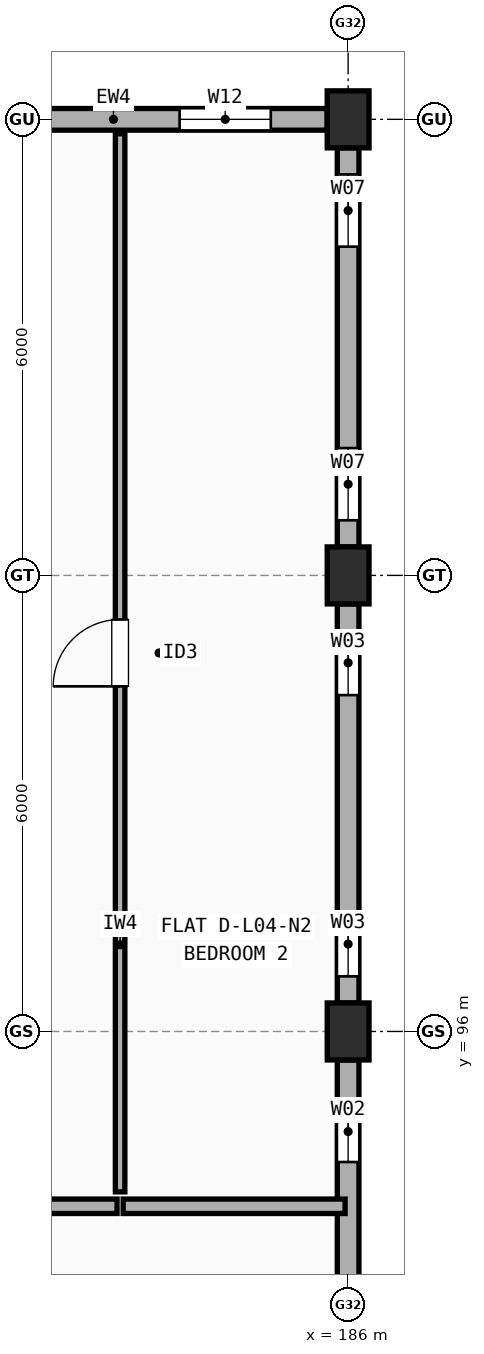
"""IFC4 building model, lengths in metres.
Left out: names, types, materials, properties, quantities, classifications, styles, units other than length and angle.
Written with IfcOpenShell. Run it as: python <this file> out.ifc"""

import sys

from ifc_helpers import new_model, si_unit, direction, frame, frame_2d, origin, origin_2d, place, context, subcontext, project, spatial, rectangle, extrude, element, fill, save


model = new_model("IFC4")
c1 = context("Model", 3, precision=1e-05, world=origin(), true_north=direction((0.0, 1.0)))
c2 = subcontext(c1, "Body", "Model", "MODEL_VIEW")
j1 = project(units=[si_unit("LENGTHUNIT", "METRE"), si_unit("PLANEANGLEUNIT", "RADIAN")], contexts=[c1])
p1 = place(None, origin())
s1 = spatial("IfcSite", under=j1, at=p1, CompositionType="ELEMENT")
p2 = place(p1, origin())
s2 = spatial("IfcBuilding", under=s1, at=p2, CompositionType="ELEMENT")
p3 = place(p2, frame((0.0, 0.0, 14.1)))
s3 = spatial("IfcBuildingStorey", under=s2, at=p3, CompositionType="ELEMENT", Elevation=14.1)
for number, where, z_axis, x_axis in (
    (1, (186.0, 96.0, 0.0), (0.0, 0.0, 1.0), (1.0, 0.0, 0.0)),
    (2, (186.0, 102.0, 0.0), (0.0, 0.0, 1.0), (1.0, 0.0, 0.0)),
    (3, (186.0, 108.0, 0.0), (0.0, 0.0, 1.0), (1.0, 0.0, 0.0)),
):
    element("IfcColumn", number, at=place(p3, frame(where, z_axis=z_axis, x_axis=x_axis)), inside=s3, PredefinedType="COLUMN", context=c2, shape_type="SweptSolid", body=[
        extrude(rectangle(XDim=0.55, YDim=0.75, at=origin_2d()), origin(), (0.0, 0.0, 1.0), 2.95),
    ])
p4 = place(p3, frame((186.0, 90.375, 0.0), z_axis=(0.0, 0.0, 1.0), x_axis=(0.0, 1.0, 0.0)))
e4 = element("IfcWall", 4, at=p4, inside=s3, PredefinedType="STANDARD", context=c2, shape_type="SweptSolid", body=[
    extrude(rectangle(XDim=5.25, YDim=0.285, at=frame_2d((2.625, 0.0))), origin(), (0.0, 0.0, 1.0), 2.432),
])
p5 = place(p4, frame((1.042, 0.0, 0.9)))
e5 = element("IfcOpeningElement", 5, at=p5, cuts=e4, PredefinedType="OPENING", context=c2, shape_type="SweptSolid", body=[
    extrude(rectangle(XDim=1.2, YDim=1.35, at=frame_2d((0.6, 0.675))), frame((0.0, 0.152, 0.0), z_axis=(0.0, -1.0, 0.0), x_axis=(1.0, 0.0, 0.0)), (0.0, 0.0, 1.0), 0.305),
])
p6 = place(p4, frame((3.907, 0.0, 0.9)))
e6 = element("IfcOpeningElement", 6, at=p6, cuts=e4, PredefinedType="OPENING", context=c2, shape_type="SweptSolid", body=[
    extrude(rectangle(XDim=0.8, YDim=1.2, at=frame_2d((0.4, 0.6))), frame((0.0, 0.152, 0.0), z_axis=(0.0, -1.0, 0.0), x_axis=(1.0, 0.0, 0.0)), (0.0, 0.0, 1.0), 0.305),
])
p7 = place(p3, frame((186.0, 96.375, 0.0), z_axis=(0.0, 0.0, 1.0), x_axis=(0.0, 1.0, 0.0)))
e7 = element("IfcWall", 7, at=p7, inside=s3, PredefinedType="STANDARD", context=c2, shape_type="SweptSolid", body=[
    extrude(rectangle(XDim=5.25, YDim=0.285, at=frame_2d((2.625, 0.0))), origin(), (0.0, 0.0, 1.0), 2.432),
])
p8 = place(p7, frame((0.35, 0.0, 0.9)))
e8 = element("IfcOpeningElement", 8, at=p8, cuts=e7, PredefinedType="OPENING", context=c2, shape_type="SweptSolid", body=[
    extrude(rectangle(XDim=0.85, YDim=1.25, at=frame_2d((0.425, 0.625))), frame((0.0, 0.152, 0.0), z_axis=(0.0, -1.0, 0.0), x_axis=(1.0, 0.0, 0.0)), (0.0, 0.0, 1.0), 0.305),
])
p9 = place(p7, frame((4.05, 0.0, 0.9)))
e9 = element("IfcOpeningElement", 9, at=p9, cuts=e7, PredefinedType="OPENING", context=c2, shape_type="SweptSolid", body=[
    extrude(rectangle(XDim=0.85, YDim=1.25, at=frame_2d((0.425, 0.625))), frame((0.0, 0.152, 0.0), z_axis=(0.0, -1.0, 0.0), x_axis=(1.0, 0.0, 0.0)), (0.0, 0.0, 1.0), 0.305),
])
p10 = place(p3, frame((186.0, 102.375, 0.0), z_axis=(0.0, 0.0, 1.0), x_axis=(0.0, 1.0, 0.0)))
e10 = element("IfcWall", 10, at=p10, inside=s3, PredefinedType="STANDARD", context=c2, shape_type="SweptSolid", body=[
    extrude(rectangle(XDim=5.25, YDim=0.285, at=frame_2d((2.625, 0.0))), origin(), (0.0, 0.0, 1.0), 2.432),
])
p11 = place(p10, frame((0.35, 0.0, 0.9)))
e11 = element("IfcOpeningElement", 11, at=p11, cuts=e10, PredefinedType="OPENING", context=c2, shape_type="SweptSolid", body=[
    extrude(rectangle(XDim=0.95, YDim=1.35, at=frame_2d((0.475, 0.675))), frame((0.0, 0.152, 0.0), z_axis=(0.0, -1.0, 0.0), x_axis=(1.0, 0.0, 0.0)), (0.0, 0.0, 1.0), 0.305),
])
p12 = place(p10, frame((3.95, 0.0, 0.9)))
e12 = element("IfcOpeningElement", 12, at=p12, cuts=e10, PredefinedType="OPENING", context=c2, shape_type="SweptSolid", body=[
    extrude(rectangle(XDim=0.95, YDim=1.35, at=frame_2d((0.475, 0.675))), frame((0.0, 0.152, 0.0), z_axis=(0.0, -1.0, 0.0), x_axis=(1.0, 0.0, 0.0)), (0.0, 0.0, 1.0), 0.305),
])
p13 = place(p3, frame((185.725, 108.0, 0.0), z_axis=(0.0, 0.0, 1.0), x_axis=(-1.0, 0.0, 0.0)))
e13 = element("IfcWall", 13, at=p13, inside=s3, PredefinedType="STANDARD", context=c2, shape_type="SweptSolid", body=[
    extrude(rectangle(XDim=5.4, YDim=0.285, at=frame_2d((2.7, 0.0))), origin(), (0.0, 0.0, 1.0), 2.432),
])
p14 = place(p13, frame((0.742, 0.0, 0.9)))
e14 = element("IfcOpeningElement", 14, at=p14, cuts=e13, PredefinedType="OPENING", context=c2, shape_type="SweptSolid", body=[
    extrude(rectangle(XDim=1.2, YDim=1.35, at=frame_2d((0.6, 0.675))), frame((0.0, 0.152, 0.0), z_axis=(0.0, -1.0, 0.0), x_axis=(1.0, 0.0, 0.0)), (0.0, 0.0, 1.0), 0.305),
])
p15 = place(p13, frame((3.683, 0.0, 0.9)))
e15 = element("IfcOpeningElement", 15, at=p15, cuts=e13, PredefinedType="OPENING", context=c2, shape_type="SweptSolid", body=[
    extrude(rectangle(XDim=0.8, YDim=1.2, at=frame_2d((0.4, 0.6))), frame((0.0, 0.152, 0.0), z_axis=(0.0, -1.0, 0.0), x_axis=(1.0, 0.0, 0.0)), (0.0, 0.0, 1.0), 0.305),
])
p16 = place(p3, frame((172.54, 93.7, 0.0), z_axis=(0.0, 0.0, 1.0), x_axis=(1.0, 0.0, 0.0)))
e16 = element("IfcWall", 16, at=p16, inside=s3, PredefinedType="SOLIDWALL", context=c2, shape_type="SweptSolid", body=[
    extrude(rectangle(XDim=10.42, YDim=0.19, at=frame_2d((5.21, 0.0))), origin(), (0.0, 0.0, 1.0), 2.95),
])
p17 = place(p16, frame((4.71, 0.0, 0.0)))
e17 = element("IfcOpeningElement", 17, at=p17, cuts=e16, PredefinedType="OPENING", context=c2, shape_type="SweptSolid", body=[
    extrude(rectangle(XDim=1.0, YDim=2.15, at=frame_2d((0.5, 1.075))), frame((0.0, 0.105, 0.0), z_axis=(0.0, -1.0, 0.0), x_axis=(1.0, 0.0, 0.0)), (0.0, 0.0, 1.0), 0.21),
])
p18 = place(p3, frame((183.04, 93.7, 0.0), z_axis=(0.0, 0.0, 1.0), x_axis=(1.0, 0.0, 0.0)))
e18 = element("IfcWall", 18, at=p18, inside=s3, PredefinedType="SOLIDWALL", context=c2, shape_type="SweptSolid", body=[
    extrude(rectangle(XDim=2.92, YDim=0.19, at=frame_2d((1.46, 0.0))), origin(), (0.0, 0.0, 1.0), 2.432),
])
p19 = place(p3, frame((183.0, 93.89, 0.0), z_axis=(0.0, 0.0, 1.0), x_axis=(0.0, 1.0, 0.0)))
e19 = element("IfcWall", 19, at=p19, inside=s3, PredefinedType="PARTITIONING", context=c2, shape_type="SweptSolid", body=[
    extrude(rectangle(XDim=13.92, YDim=0.125, at=frame_2d((6.96, 0.0))), origin(), (0.0, 0.0, 1.0), 2.408),
])
p20 = place(p19, frame((6.65, 0.0, 0.0)))
e20 = element("IfcOpeningElement", 20, at=p20, cuts=e19, PredefinedType="OPENING", context=c2, shape_type="SweptSolid", body=[
    extrude(rectangle(XDim=0.88, YDim=2.1, at=frame_2d((0.44, 1.05))), frame((0.0, 0.073, 0.0), z_axis=(0.0, -1.0, 0.0), x_axis=(1.0, 0.0, 0.0)), (0.0, 0.0, 1.0), 0.145),
])
p21 = place(p6, origin())
e21 = element("IfcWindow", 21, at=p21, inside=s3, PartitioningType="SINGLE_PANEL", PredefinedType="WINDOW", context=c2, shape_type="SweptSolid", body=[
    extrude(rectangle(XDim=0.8, YDim=1.2, at=frame_2d((0.4, 0.6))), frame((0.0, 0.03, 0.0), z_axis=(0.0, -1.0, 0.0), x_axis=(1.0, 0.0, 0.0)), (0.0, 0.0, 1.0), 0.06),
])
fill(e6, e21)
p22 = place(p8, origin())
e22 = element("IfcWindow", 22, at=p22, inside=s3, PartitioningType="SINGLE_PANEL", PredefinedType="WINDOW", context=c2, shape_type="SweptSolid", body=[
    extrude(rectangle(XDim=0.85, YDim=1.25, at=frame_2d((0.425, 0.625))), frame((0.0, 0.03, 0.0), z_axis=(0.0, -1.0, 0.0), x_axis=(1.0, 0.0, 0.0)), (0.0, 0.0, 1.0), 0.06),
])
fill(e8, e22)
p23 = place(p9, origin())
e23 = element("IfcWindow", 23, at=p23, inside=s3, PartitioningType="SINGLE_PANEL", PredefinedType="WINDOW", context=c2, shape_type="SweptSolid", body=[
    extrude(rectangle(XDim=0.85, YDim=1.25, at=frame_2d((0.425, 0.625))), frame((0.0, 0.03, 0.0), z_axis=(0.0, -1.0, 0.0), x_axis=(1.0, 0.0, 0.0)), (0.0, 0.0, 1.0), 0.06),
])
fill(e9, e23)
p24 = place(p11, origin())
e24 = element("IfcWindow", 24, at=p24, inside=s3, PartitioningType="SINGLE_PANEL", PredefinedType="WINDOW", context=c2, shape_type="SweptSolid", body=[
    extrude(rectangle(XDim=0.95, YDim=1.35, at=frame_2d((0.475, 0.675))), frame((0.0, 0.03, 0.0), z_axis=(0.0, -1.0, 0.0), x_axis=(1.0, 0.0, 0.0)), (0.0, 0.0, 1.0), 0.06),
])
fill(e11, e24)
p25 = place(p12, origin())
e25 = element("IfcWindow", 25, at=p25, inside=s3, PartitioningType="SINGLE_PANEL", PredefinedType="WINDOW", context=c2, shape_type="SweptSolid", body=[
    extrude(rectangle(XDim=0.95, YDim=1.35, at=frame_2d((0.475, 0.675))), frame((0.0, 0.03, 0.0), z_axis=(0.0, -1.0, 0.0), x_axis=(1.0, 0.0, 0.0)), (0.0, 0.0, 1.0), 0.06),
])
fill(e12, e25)
p26 = place(p14, origin())
e26 = element("IfcWindow", 26, at=p26, inside=s3, PartitioningType="SINGLE_PANEL", PredefinedType="WINDOW", context=c2, shape_type="SweptSolid", body=[
    extrude(rectangle(XDim=1.2, YDim=1.35, at=frame_2d((0.6, 0.675))), frame((0.0, 0.03, 0.0), z_axis=(0.0, -1.0, 0.0), x_axis=(1.0, 0.0, 0.0)), (0.0, 0.0, 1.0), 0.06),
])
fill(e14, e26)
p27 = place(p20, origin())
e27 = element("IfcDoor", 27, at=p27, inside=s3, OperationType="SINGLE_SWING_LEFT", PredefinedType="DOOR", context=c2, shape_type="SweptSolid", body=[
    extrude(rectangle(XDim=0.88, YDim=2.1, at=frame_2d((0.44, 1.05))), frame((0.0, 0.025, 0.0), z_axis=(0.0, -1.0, 0.0), x_axis=(1.0, 0.0, 0.0)), (0.0, 0.0, 1.0), 0.05),
])
fill(e20, e27)
save(model, sys.argv[1])
